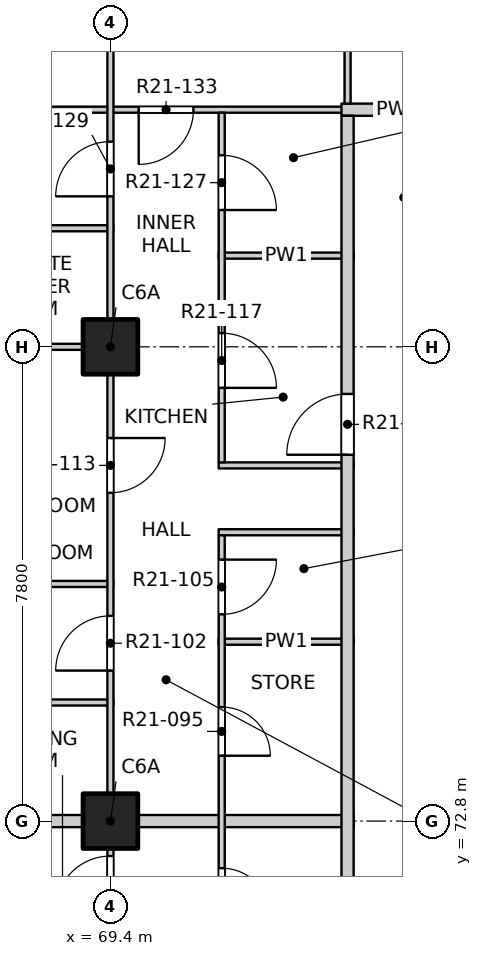
"""IFC4 building model, lengths in metres.
Left out: names, types, materials, properties, quantities, classifications, styles, units other than length and angle.
Written with IfcOpenShell. Run it as: python <this file> out.ifc"""

import sys

from ifc_helpers import new_model, si_unit, direction, frame, frame_2d, origin, origin_2d, place, context, subcontext, project, spatial, rectangle, extrude, element, fill, save


model = new_model("IFC4")
c1 = context("Model", 3, precision=1e-05, world=origin(), true_north=direction((0.0, 1.0)))
c2 = subcontext(c1, "Body", "Model", "MODEL_VIEW")
j1 = project(units=[si_unit("LENGTHUNIT", "METRE"), si_unit("PLANEANGLEUNIT", "RADIAN")], contexts=[c1])
p1 = place(None, origin())
s1 = spatial("IfcSite", under=j1, at=p1, CompositionType="ELEMENT")
p2 = place(p1, origin())
s2 = spatial("IfcBuilding", under=s1, at=p2, CompositionType="ELEMENT")
p3 = place(p2, frame((0.0, 0.0, 221.1)))
s3 = spatial("IfcBuildingStorey", under=s2, at=p3, CompositionType="ELEMENT", Elevation=221.1)
for number, where, z_axis, x_axis in (
    (1, (69.4, 72.8, -0.25), (0.0, 0.0, 1.0), (1.0, 0.0, 0.0)),
    (2, (69.4, 80.6, -0.25), (0.0, 0.0, 1.0), (1.0, 0.0, 0.0)),
):
    element("IfcColumn", number, at=place(p3, frame(where, z_axis=z_axis, x_axis=x_axis)), inside=s3, PredefinedType="COLUMN", context=c2, shape_type="SweptSolid", body=[
        extrude(rectangle(XDim=0.9, YDim=0.9, at=origin_2d()), origin(), (0.0, 0.0, 1.0), 3.4),
    ])
p4 = place(p3, frame((61.9, 72.8, 0.0), z_axis=(0.0, 0.0, 1.0), x_axis=(1.0, 0.0, 0.0)))
e3 = element("IfcWall", 3, at=p4, inside=s3, PredefinedType="PARTITIONING", context=c2, shape_type="SweptSolid", body=[
    extrude(rectangle(XDim=11.5, YDim=0.2, at=frame_2d((5.75, 0.0))), origin(), (0.0, 0.0, 1.0), 3.15),
])
p5 = place(p3, frame((66.05, 74.75, 0.0), z_axis=(0.0, 0.0, 1.0), x_axis=(1.0, 0.0, 0.0)))
e4 = element("IfcWall", 4, at=p5, inside=s3, PredefinedType="PARTITIONING", context=c2, shape_type="SweptSolid", body=[
    extrude(rectangle(XDim=3.4, YDim=0.1, at=frame_2d((1.7, 0.0))), origin(), (0.0, 0.0, 1.0), 3.15),
])
p6 = place(p3, frame((71.18, 75.75, 0.0), z_axis=(0.0, 0.0, 1.0), x_axis=(1.0, 0.0, 0.0)))
e5 = element("IfcWall", 5, at=p6, inside=s3, PredefinedType="PARTITIONING", context=c2, shape_type="SweptSolid", body=[
    extrude(rectangle(XDim=2.22, YDim=0.1, at=frame_2d((1.11, 0.0))), origin(), (0.0, 0.0, 1.0), 3.15),
])
p7 = place(p3, frame((61.9, 76.7, 0.0), z_axis=(0.0, 0.0, 1.0), x_axis=(1.0, 0.0, 0.0)))
e6 = element("IfcWall", 6, at=p7, inside=s3, PredefinedType="PARTITIONING", context=c2, shape_type="SweptSolid", body=[
    extrude(rectangle(XDim=7.55, YDim=0.1, at=frame_2d((3.775, 0.0))), origin(), (0.0, 0.0, 1.0), 2.55),
])
for number, where, z_axis, x_axis in (
    (7, (71.18, 77.55, 0.0), (0.0, 0.0, 1.0), (1.0, 0.0, 0.0)),
    (8, (71.18, 78.65, 0.0), (0.0, 0.0, 1.0), (1.0, 0.0, 0.0)),
):
    element("IfcWall", number, at=place(p3, frame(where, z_axis=z_axis, x_axis=x_axis)), inside=s3, PredefinedType="PARTITIONING", context=c2, shape_type="SweptSolid", body=[
        extrude(rectangle(XDim=2.22, YDim=0.1, at=frame_2d((1.11, 0.0))), origin(), (0.0, 0.0, 1.0), 3.15),
    ])
p8 = place(p3, frame((61.9, 80.6, 0.0), z_axis=(0.0, 0.0, 1.0), x_axis=(1.0, 0.0, 0.0)))
e9 = element("IfcWall", 9, at=p8, inside=s3, PredefinedType="PARTITIONING", context=c2, shape_type="SweptSolid", body=[
    extrude(rectangle(XDim=7.55, YDim=0.1, at=frame_2d((3.775, 0.0))), origin(), (0.0, 0.0, 1.0), 3.15),
])
p9 = place(p3, frame((71.18, 82.1, 0.0), z_axis=(0.0, 0.0, 1.0), x_axis=(1.0, 0.0, 0.0)))
e10 = element("IfcWall", 10, at=p9, inside=s3, PredefinedType="PARTITIONING", context=c2, shape_type="SweptSolid", body=[
    extrude(rectangle(XDim=2.22, YDim=0.1, at=frame_2d((1.11, 0.0))), origin(), (0.0, 0.0, 1.0), 3.15),
])
p10 = place(p3, frame((66.05, 82.55, 0.0), z_axis=(0.0, 0.0, 1.0), x_axis=(1.0, 0.0, 0.0)))
e11 = element("IfcWall", 11, at=p10, inside=s3, PredefinedType="PARTITIONING", context=c2, shape_type="SweptSolid", body=[
    extrude(rectangle(XDim=3.4, YDim=0.1, at=frame_2d((1.7, 0.0))), origin(), (0.0, 0.0, 1.0), 3.15),
])
p11 = place(p3, frame((61.9, 84.5, 0.0), z_axis=(0.0, 0.0, 1.0), x_axis=(1.0, 0.0, 0.0)))
e12 = element("IfcWall", 12, at=p11, inside=s3, PredefinedType="PARTITIONING", context=c2, shape_type="SweptSolid", body=[
    extrude(rectangle(XDim=11.5, YDim=0.1, at=frame_2d((5.75, 0.0))), origin(), (0.0, 0.0, 1.0), 3.15),
])
p12 = place(p11, frame((7.965, 0.0, 0.0)))
e13 = element("IfcOpeningElement", 13, at=p12, cuts=e12, PredefinedType="OPENING", context=c2, shape_type="SweptSolid", body=[
    extrude(rectangle(XDim=0.9, YDim=2.1, at=frame_2d((0.45, 1.05))), frame((0.0, 0.06, 0.0), z_axis=(0.0, -1.0, 0.0), x_axis=(1.0, 0.0, 0.0)), (0.0, 0.0, 1.0), 0.12),
])
p13 = place(p3, frame((73.2, 84.5, 0.0), z_axis=(0.0, 0.0, 1.0), x_axis=(1.0, 0.0, 0.0)))
e14 = element("IfcWall", 14, at=p13, inside=s3, PredefinedType="PARTITIONING", context=c2, shape_type="SweptSolid", body=[
    extrude(rectangle(XDim=1.85, YDim=0.2, at=frame_2d((0.925, 0.0))), origin(), (0.0, 0.0, 1.0), 3.15),
])
p14 = place(p3, frame((69.4, 41.9, 0.0), z_axis=(0.0, 0.0, 1.0), x_axis=(0.0, 1.0, 0.0)))
e15 = element("IfcWall", 15, at=p14, inside=s3, PredefinedType="PARTITIONING", context=c2, shape_type="SweptSolid", body=[
    extrude(rectangle(XDim=46.2, YDim=0.1, at=frame_2d((23.1, 0.0))), origin(), (0.0, 0.0, 1.0), 3.15),
])
p15 = place(p14, frame((1.2, 0.0, 0.0)))
e16 = element("IfcOpeningElement", 16, at=p15, cuts=e15, PredefinedType="OPENING", context=c2, shape_type="SweptSolid", body=[
    extrude(rectangle(XDim=0.9, YDim=2.1, at=frame_2d((0.45, 1.05))), frame((0.0, 0.06, 0.0), z_axis=(0.0, -1.0, 0.0), x_axis=(1.0, 0.0, 0.0)), (0.0, 0.0, 1.0), 0.12),
])
p16 = place(p14, frame((6.025, 0.0, 0.0)))
e17 = element("IfcOpeningElement", 17, at=p16, cuts=e15, PredefinedType="OPENING", context=c2, shape_type="SweptSolid", body=[
    extrude(rectangle(XDim=0.9, YDim=2.1, at=frame_2d((0.45, 1.05))), frame((0.0, 0.06, 0.0), z_axis=(0.0, -1.0, 0.0), x_axis=(1.0, 0.0, 0.0)), (0.0, 0.0, 1.0), 0.12),
])
p17 = place(p14, frame((9.0, 0.0, 0.0)))
e18 = element("IfcOpeningElement", 18, at=p17, cuts=e15, PredefinedType="OPENING", context=c2, shape_type="SweptSolid", body=[
    extrude(rectangle(XDim=0.9, YDim=2.1, at=frame_2d((0.45, 1.05))), frame((0.0, 0.06, 0.0), z_axis=(0.0, -1.0, 0.0), x_axis=(1.0, 0.0, 0.0)), (0.0, 0.0, 1.0), 0.12),
])
p18 = place(p14, frame((12.9, 0.0, 0.0)))
e19 = element("IfcOpeningElement", 19, at=p18, cuts=e15, PredefinedType="OPENING", context=c2, shape_type="SweptSolid", body=[
    extrude(rectangle(XDim=0.9, YDim=2.1, at=frame_2d((0.45, 1.05))), frame((0.0, 0.06, 0.0), z_axis=(0.0, -1.0, 0.0), x_axis=(1.0, 0.0, 0.0)), (0.0, 0.0, 1.0), 0.12),
])
p19 = place(p14, frame((17.775, 0.0, 0.0)))
e20 = element("IfcOpeningElement", 20, at=p19, cuts=e15, PredefinedType="OPENING", context=c2, shape_type="SweptSolid", body=[
    extrude(rectangle(XDim=0.9, YDim=2.1, at=frame_2d((0.45, 1.05))), frame((0.0, 0.06, 0.0), z_axis=(0.0, -1.0, 0.0), x_axis=(1.0, 0.0, 0.0)), (0.0, 0.0, 1.0), 0.12),
])
p20 = place(p14, frame((20.7, 0.0, 0.0)))
e21 = element("IfcOpeningElement", 21, at=p20, cuts=e15, PredefinedType="OPENING", context=c2, shape_type="SweptSolid", body=[
    extrude(rectangle(XDim=0.9, YDim=2.1, at=frame_2d((0.45, 1.05))), frame((0.0, 0.06, 0.0), z_axis=(0.0, -1.0, 0.0), x_axis=(1.0, 0.0, 0.0)), (0.0, 0.0, 1.0), 0.12),
])
p21 = place(p14, frame((24.6, 0.0, 0.0)))
e22 = element("IfcOpeningElement", 22, at=p21, cuts=e15, PredefinedType="OPENING", context=c2, shape_type="SweptSolid", body=[
    extrude(rectangle(XDim=0.9, YDim=2.1, at=frame_2d((0.45, 1.05))), frame((0.0, 0.06, 0.0), z_axis=(0.0, -1.0, 0.0), x_axis=(1.0, 0.0, 0.0)), (0.0, 0.0, 1.0), 0.12),
])
p22 = place(p14, frame((29.425, 0.0, 0.0)))
e23 = element("IfcOpeningElement", 23, at=p22, cuts=e15, PredefinedType="OPENING", context=c2, shape_type="SweptSolid", body=[
    extrude(rectangle(XDim=0.9, YDim=2.1, at=frame_2d((0.45, 1.05))), frame((0.0, 0.06, 0.0), z_axis=(0.0, -1.0, 0.0), x_axis=(1.0, 0.0, 0.0)), (0.0, 0.0, 1.0), 0.12),
])
p23 = place(p14, frame((33.375, 0.0, 0.0)))
e24 = element("IfcOpeningElement", 24, at=p23, cuts=e15, PredefinedType="OPENING", context=c2, shape_type="SweptSolid", body=[
    extrude(rectangle(XDim=0.9, YDim=2.1, at=frame_2d((0.45, 1.05))), frame((0.0, 0.06, 0.0), z_axis=(0.0, -1.0, 0.0), x_axis=(1.0, 0.0, 0.0)), (0.0, 0.0, 1.0), 0.12),
])
p24 = place(p14, frame((36.3, 0.0, 0.0)))
e25 = element("IfcOpeningElement", 25, at=p24, cuts=e15, PredefinedType="OPENING", context=c2, shape_type="SweptSolid", body=[
    extrude(rectangle(XDim=0.9, YDim=2.1, at=frame_2d((0.45, 1.05))), frame((0.0, 0.06, 0.0), z_axis=(0.0, -1.0, 0.0), x_axis=(1.0, 0.0, 0.0)), (0.0, 0.0, 1.0), 0.12),
])
p25 = place(p14, frame((41.175, 0.0, 0.0)))
e26 = element("IfcOpeningElement", 26, at=p25, cuts=e15, PredefinedType="OPENING", context=c2, shape_type="SweptSolid", body=[
    extrude(rectangle(XDim=0.9, YDim=2.1, at=frame_2d((0.45, 1.05))), frame((0.0, 0.06, 0.0), z_axis=(0.0, -1.0, 0.0), x_axis=(1.0, 0.0, 0.0)), (0.0, 0.0, 1.0), 0.12),
])
p26 = place(p14, frame((44.1, 0.0, 0.0)))
e27 = element("IfcOpeningElement", 27, at=p26, cuts=e15, PredefinedType="OPENING", context=c2, shape_type="SweptSolid", body=[
    extrude(rectangle(XDim=0.9, YDim=2.1, at=frame_2d((0.45, 1.05))), frame((0.0, 0.06, 0.0), z_axis=(0.0, -1.0, 0.0), x_axis=(1.0, 0.0, 0.0)), (0.0, 0.0, 1.0), 0.12),
])
p27 = place(p3, frame((71.23, 68.25, 0.0), z_axis=(0.0, 0.0, 1.0), x_axis=(0.0, 1.0, 0.0)))
e28 = element("IfcWall", 28, at=p27, inside=s3, PredefinedType="PARTITIONING", context=c2, shape_type="SweptSolid", body=[
    extrude(rectangle(XDim=9.25, YDim=0.1, at=frame_2d((4.625, 0.0))), origin(), (0.0, 0.0, 1.0), 3.15),
])
p28 = place(p27, frame((0.625, 0.0, 0.0)))
e29 = element("IfcOpeningElement", 29, at=p28, cuts=e28, PredefinedType="OPENING", context=c2, shape_type="SweptSolid", body=[
    extrude(rectangle(XDim=0.9, YDim=2.1, at=frame_2d((0.45, 1.05))), frame((0.0, 0.06, 0.0), z_axis=(0.0, -1.0, 0.0), x_axis=(1.0, 0.0, 0.0)), (0.0, 0.0, 1.0), 0.12),
])
p29 = place(p27, frame((2.975, 0.0, 0.0)))
e30 = element("IfcOpeningElement", 30, at=p29, cuts=e28, PredefinedType="OPENING", context=c2, shape_type="SweptSolid", body=[
    extrude(rectangle(XDim=0.8, YDim=2.1, at=frame_2d((0.4, 1.05))), frame((0.0, 0.06, 0.0), z_axis=(0.0, -1.0, 0.0), x_axis=(1.0, 0.0, 0.0)), (0.0, 0.0, 1.0), 0.12),
])
p30 = place(p27, frame((5.625, 0.0, 0.0)))
e31 = element("IfcOpeningElement", 31, at=p30, cuts=e28, PredefinedType="OPENING", context=c2, shape_type="SweptSolid", body=[
    extrude(rectangle(XDim=0.8, YDim=2.1, at=frame_2d((0.4, 1.05))), frame((0.0, 0.06, 0.0), z_axis=(0.0, -1.0, 0.0), x_axis=(1.0, 0.0, 0.0)), (0.0, 0.0, 1.0), 0.12),
])
p31 = place(p27, frame((7.95, 0.0, 0.0)))
e32 = element("IfcOpeningElement", 32, at=p31, cuts=e28, PredefinedType="OPENING", context=c2, shape_type="SweptSolid", body=[
    extrude(rectangle(XDim=0.9, YDim=2.1, at=frame_2d((0.45, 1.05))), frame((0.0, 0.06, 0.0), z_axis=(0.0, -1.0, 0.0), x_axis=(1.0, 0.0, 0.0)), (0.0, 0.0, 1.0), 0.12),
])
p32 = place(p3, frame((71.23, 78.7, 0.0), z_axis=(0.0, 0.0, 1.0), x_axis=(0.0, 1.0, 0.0)))
e33 = element("IfcWall", 33, at=p32, inside=s3, PredefinedType="PARTITIONING", context=c2, shape_type="SweptSolid", body=[
    extrude(rectangle(XDim=5.75, YDim=0.1, at=frame_2d((2.875, 0.0))), origin(), (0.0, 0.0, 1.0), 3.15),
])
p33 = place(p32, frame((1.225, 0.0, 0.0)))
e34 = element("IfcOpeningElement", 34, at=p33, cuts=e33, PredefinedType="OPENING", context=c2, shape_type="SweptSolid", body=[
    extrude(rectangle(XDim=0.9, YDim=2.1, at=frame_2d((0.45, 1.05))), frame((0.0, 0.06, 0.0), z_axis=(0.0, -1.0, 0.0), x_axis=(1.0, 0.0, 0.0)), (0.0, 0.0, 1.0), 0.12),
])
p34 = place(p32, frame((4.15, 0.0, 0.0)))
e35 = element("IfcOpeningElement", 35, at=p34, cuts=e33, PredefinedType="OPENING", context=c2, shape_type="SweptSolid", body=[
    extrude(rectangle(XDim=0.9, YDim=2.1, at=frame_2d((0.45, 1.05))), frame((0.0, 0.06, 0.0), z_axis=(0.0, -1.0, 0.0), x_axis=(1.0, 0.0, 0.0)), (0.0, 0.0, 1.0), 0.12),
])
p35 = place(p3, frame((73.3, 49.5, 0.0), z_axis=(0.0, 0.0, 1.0), x_axis=(0.0, 1.0, 0.0)))
e36 = element("IfcWall", 36, at=p35, inside=s3, PredefinedType="PARTITIONING", context=c2, shape_type="SweptSolid", body=[
    extrude(rectangle(XDim=34.9, YDim=0.2, at=frame_2d((17.45, 0.0))), origin(), (0.0, 0.0, 1.0), 3.15),
])
p36 = place(p35, frame((3.325, 0.0, 0.0)))
e37 = element("IfcOpeningElement", 37, at=p36, cuts=e36, PredefinedType="OPENING", context=c2, shape_type="SweptSolid", body=[
    extrude(rectangle(XDim=1.0, YDim=2.1, at=frame_2d((0.5, 1.05))), frame((0.0, 0.11, 0.0), z_axis=(0.0, -1.0, 0.0), x_axis=(1.0, 0.0, 0.0)), (0.0, 0.0, 1.0), 0.22),
])
p37 = place(p35, frame((18.875, 0.0, 0.0)))
e38 = element("IfcOpeningElement", 38, at=p37, cuts=e36, PredefinedType="OPENING", context=c2, shape_type="SweptSolid", body=[
    extrude(rectangle(XDim=1.0, YDim=2.1, at=frame_2d((0.5, 1.05))), frame((0.0, 0.11, 0.0), z_axis=(0.0, -1.0, 0.0), x_axis=(1.0, 0.0, 0.0)), (0.0, 0.0, 1.0), 0.22),
])
p38 = place(p35, frame((29.325, 0.0, 0.0)))
e39 = element("IfcOpeningElement", 39, at=p38, cuts=e36, PredefinedType="OPENING", context=c2, shape_type="SweptSolid", body=[
    extrude(rectangle(XDim=1.0, YDim=2.1, at=frame_2d((0.5, 1.05))), frame((0.0, 0.11, 0.0), z_axis=(0.0, -1.0, 0.0), x_axis=(1.0, 0.0, 0.0)), (0.0, 0.0, 1.0), 0.22),
])
p39 = place(p3, frame((73.3, 84.6, 0.0), z_axis=(0.0, 0.0, 1.0), x_axis=(0.0, 1.0, 0.0)))
e40 = element("IfcWall", 40, at=p39, inside=s3, PredefinedType="PARTITIONING", context=c2, shape_type="SweptSolid", body=[
    extrude(rectangle(XDim=3.5, YDim=0.1, at=frame_2d((1.75, 0.0))), origin(), (0.0, 0.0, 1.0), 3.15),
])
p40 = place(p39, frame((1.4, 0.0, 0.0)))
e41 = element("IfcOpeningElement", 41, at=p40, cuts=e40, PredefinedType="OPENING", context=c2, shape_type="SweptSolid", body=[
    extrude(rectangle(XDim=0.9, YDim=2.1, at=frame_2d((0.45, 1.05))), frame((0.0, 0.06, 0.0), z_axis=(0.0, -1.0, 0.0), x_axis=(1.0, 0.0, 0.0)), (0.0, 0.0, 1.0), 0.12),
])
p41 = place(p29, origin())
e42 = element("IfcDoor", 42, at=p41, inside=s3, OperationType="SINGLE_SWING_RIGHT", PredefinedType="DOOR", context=c2, shape_type="SweptSolid", body=[
    extrude(rectangle(XDim=0.8, YDim=2.1, at=frame_2d((0.4, 1.05))), frame((0.0, 0.025, 0.0), z_axis=(0.0, -1.0, 0.0), x_axis=(1.0, 0.0, 0.0)), (0.0, 0.0, 1.0), 0.05),
])
fill(e30, e42)
p42 = place(p22, origin())
e43 = element("IfcDoor", 43, at=p42, inside=s3, OperationType="SINGLE_SWING_LEFT", PredefinedType="DOOR", context=c2, shape_type="SweptSolid", body=[
    extrude(rectangle(XDim=0.9, YDim=2.1, at=frame_2d((0.45, 1.05))), frame((0.0, 0.025, 0.0), z_axis=(0.0, -1.0, 0.0), x_axis=(1.0, 0.0, 0.0)), (0.0, 0.0, 1.0), 0.05),
])
fill(e23, e43)
p43 = place(p30, origin())
e44 = element("IfcDoor", 44, at=p43, inside=s3, OperationType="SINGLE_SWING_RIGHT", PredefinedType="DOOR", context=c2, shape_type="SweptSolid", body=[
    extrude(rectangle(XDim=0.8, YDim=2.1, at=frame_2d((0.4, 1.05))), frame((0.0, 0.025, 0.0), z_axis=(0.0, -1.0, 0.0), x_axis=(1.0, 0.0, 0.0)), (0.0, 0.0, 1.0), 0.05),
])
fill(e31, e44)
p44 = place(p23, origin())
e45 = element("IfcDoor", 45, at=p44, inside=s3, OperationType="SINGLE_SWING_LEFT", PredefinedType="DOOR", context=c2, shape_type="SweptSolid", body=[
    extrude(rectangle(XDim=0.9, YDim=2.1, at=frame_2d((0.45, 1.05))), frame((0.0, 0.025, 0.0), z_axis=(0.0, -1.0, 0.0), x_axis=(1.0, 0.0, 0.0)), (0.0, 0.0, 1.0), 0.05),
])
fill(e24, e45)
p45 = place(p31, origin())
e46 = element("IfcDoor", 46, at=p45, inside=s3, OperationType="SINGLE_SWING_LEFT", PredefinedType="DOOR", context=c2, shape_type="SweptSolid", body=[
    extrude(rectangle(XDim=0.9, YDim=2.1, at=frame_2d((0.45, 1.05))), frame((0.0, 0.025, 0.0), z_axis=(0.0, -1.0, 0.0), x_axis=(1.0, 0.0, 0.0)), (0.0, 0.0, 1.0), 0.05),
])
fill(e32, e46)
p46 = place(p24, origin())
e47 = element("IfcDoor", 47, at=p46, inside=s3, OperationType="SINGLE_SWING_LEFT", PredefinedType="DOOR", context=c2, shape_type="SweptSolid", body=[
    extrude(rectangle(XDim=0.9, YDim=2.1, at=frame_2d((0.45, 1.05))), frame((0.0, 0.025, 0.0), z_axis=(0.0, -1.0, 0.0), x_axis=(1.0, 0.0, 0.0)), (0.0, 0.0, 1.0), 0.05),
])
fill(e25, e47)
p47 = place(p38, origin())
e48 = element("IfcDoor", 48, at=p47, inside=s3, OperationType="SINGLE_SWING_RIGHT", PredefinedType="DOOR", context=c2, shape_type="SweptSolid", body=[
    extrude(rectangle(XDim=1.0, YDim=2.1, at=frame_2d((0.5, 1.05))), frame((0.0, 0.025, 0.0), z_axis=(0.0, -1.0, 0.0), x_axis=(1.0, 0.0, 0.0)), (0.0, 0.0, 1.0), 0.05),
])
fill(e39, e48)
p48 = place(p33, origin())
e49 = element("IfcDoor", 49, at=p48, inside=s3, OperationType="SINGLE_SWING_RIGHT", PredefinedType="DOOR", context=c2, shape_type="SweptSolid", body=[
    extrude(rectangle(XDim=0.9, YDim=2.1, at=frame_2d((0.45, 1.05))), frame((0.0, 0.025, 0.0), z_axis=(0.0, -1.0, 0.0), x_axis=(1.0, 0.0, 0.0)), (0.0, 0.0, 1.0), 0.05),
])
fill(e34, e49)
p49 = place(p34, origin())
e50 = element("IfcDoor", 50, at=p49, inside=s3, OperationType="SINGLE_SWING_RIGHT", PredefinedType="DOOR", context=c2, shape_type="SweptSolid", body=[
    extrude(rectangle(XDim=0.9, YDim=2.1, at=frame_2d((0.45, 1.05))), frame((0.0, 0.025, 0.0), z_axis=(0.0, -1.0, 0.0), x_axis=(1.0, 0.0, 0.0)), (0.0, 0.0, 1.0), 0.05),
])
fill(e35, e50)
p50 = place(p25, origin())
e51 = element("IfcDoor", 51, at=p50, inside=s3, OperationType="SINGLE_SWING_LEFT", PredefinedType="DOOR", context=c2, shape_type="SweptSolid", body=[
    extrude(rectangle(XDim=0.9, YDim=2.1, at=frame_2d((0.45, 1.05))), frame((0.0, 0.025, 0.0), z_axis=(0.0, -1.0, 0.0), x_axis=(1.0, 0.0, 0.0)), (0.0, 0.0, 1.0), 0.05),
])
fill(e26, e51)
p51 = place(p12, origin())
e52 = element("IfcDoor", 52, at=p51, inside=s3, OperationType="SINGLE_SWING_RIGHT", PredefinedType="DOOR", context=c2, shape_type="SweptSolid", body=[
    extrude(rectangle(XDim=0.9, YDim=2.1, at=frame_2d((0.45, 1.05))), frame((0.0, 0.025, 0.0), z_axis=(0.0, -1.0, 0.0), x_axis=(1.0, 0.0, 0.0)), (0.0, 0.0, 1.0), 0.05),
])
fill(e13, e52)
save(model, sys.argv[1])
